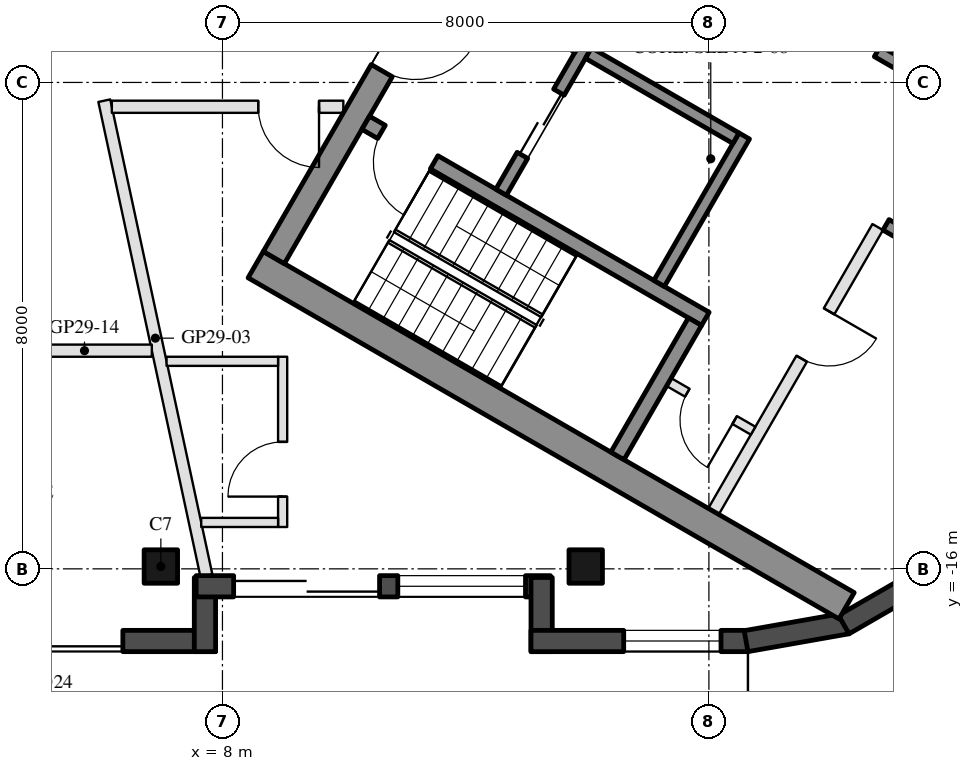
"""IFC4 building model, lengths in metres.
Left out: names, types, materials, properties, quantities, classifications, styles, units other than length and angle.
Written with IfcOpenShell. Run it as: python <this file> out.ifc"""

import sys

from ifc_helpers import new_model, si_unit, direction, frame, frame_2d, origin, origin_2d, place, context, subcontext, project, spatial, rectangle, hollow_rectangle, extrude, boolean, halfspace, element, fill, save


model = new_model("IFC4")
c1 = context("Model", 3, precision=1e-05, world=origin(), true_north=direction((0.0, 1.0)))
c2 = subcontext(c1, "Body", "Model", "MODEL_VIEW")
j1 = project(units=[si_unit("LENGTHUNIT", "METRE"), si_unit("PLANEANGLEUNIT", "RADIAN")], contexts=[c1])
p1 = place(None, origin())
s1 = spatial("IfcSite", under=j1, at=p1, CompositionType="ELEMENT")
p2 = place(p1, origin())
s2 = spatial("IfcBuilding", under=s1, at=p2, CompositionType="ELEMENT")
p3 = place(p2, frame((0.0, 0.0, 294.8)))
s3 = spatial("IfcBuildingStorey", under=s2, at=p3, CompositionType="ELEMENT", Elevation=294.8)
p4 = place(p3, frame((6.987, -15.962, 0.0), z_axis=(0.0, 0.0, 1.0), x_axis=(-1.0, 0.0, 0.0)))
e1 = element("IfcColumn", 1, at=p4, inside=s3, PredefinedType="COLUMN", context=c2, shape_type="SweptSolid", body=[
    boolean("DIFFERENCE", extrude(hollow_rectangle(XDim=0.55, YDim=0.55, WallThickness=0.025, at=origin_2d()), origin(), (0.0, 0.0, 1.0), 3.7), halfspace(frame((0.0, 0.0, 3.666), z_axis=(0.0, 0.0, 1.0), x_axis=(1.0, 0.0, 0.0)), False)),
])
p5 = place(p3, frame((13.974, -15.962, 0.0), z_axis=(0.0, 0.0, 1.0), x_axis=(-1.0, 0.0, 0.0)))
e2 = element("IfcColumn", 2, at=p5, inside=s3, PredefinedType="COLUMN", context=c2, shape_type="SweptSolid", body=[
    boolean("DIFFERENCE", extrude(hollow_rectangle(XDim=0.55, YDim=0.55, WallThickness=0.025, at=origin_2d()), origin(), (0.0, 0.0, 1.0), 3.7), halfspace(frame((0.0, 0.0, 3.66), z_axis=(0.0, 0.0, 1.0), x_axis=(1.0, 0.0, 0.0)), False)),
])
p6 = place(p3, frame((-0.9, -17.187, 0.0), z_axis=(0.0, 0.0, 1.0), x_axis=(1.0, 0.0, 0.0)))
e3 = element("IfcWall", 3, at=p6, inside=s3, PredefinedType="SOLIDWALL", context=c2, shape_type="SweptSolid", body=[
    extrude(rectangle(XDim=8.787, YDim=0.35, at=frame_2d((4.394, 0.0))), origin(), (0.0, 0.0, 1.0), 3.55),
])
p7 = place(p6, frame((4.862, 0.0, 0.0)))
e4 = element("IfcOpeningElement", 4, at=p7, cuts=e3, PredefinedType="OPENING", context=c2, shape_type="SweptSolid", body=[
    extrude(rectangle(XDim=2.4, YDim=2.4, at=frame_2d((1.2, 1.2))), frame((0.0, 0.185, 0.0), z_axis=(0.0, -1.0, 0.0), x_axis=(1.0, 0.0, 0.0)), (0.0, 0.0, 1.0), 0.37),
])
p8 = place(p6, frame((2.55, 0.0, 0.3)))
e5 = element("IfcOpeningElement", 5, at=p8, cuts=e3, PredefinedType="OPENING", context=c2, shape_type="SweptSolid", body=[
    extrude(rectangle(XDim=2.0, YDim=2.65, at=frame_2d((1.0, 1.325))), frame((0.0, 0.185, 0.0), z_axis=(0.0, -1.0, 0.0), x_axis=(1.0, 0.0, 0.0)), (0.0, 0.0, 1.0), 0.37),
])
p9 = place(p3, frame((7.712, -17.362, 0.0), z_axis=(0.0, 0.0, 1.0), x_axis=(0.0, 1.0, 0.0)))
e6 = element("IfcWall", 6, at=p9, inside=s3, PredefinedType="SOLIDWALL", context=c2, shape_type="SweptSolid", body=[
    extrude(rectangle(XDim=1.22, YDim=0.35, at=frame_2d((0.61, 0.0))), origin(), (0.0, 0.0, 1.0), 3.55),
])
p10 = place(p3, frame((7.567, -16.287, 0.0), z_axis=(0.0, 0.0, 1.0), x_axis=(1.0, 0.0, 0.0)))
e7 = element("IfcWall", 7, at=p10, inside=s3, PredefinedType="SOLIDWALL", context=c2, shape_type="SweptSolid", body=[
    extrude(rectangle(XDim=5.827, YDim=0.35, at=frame_2d((2.914, 0.0))), origin(), (0.0, 0.0, 1.0), 3.55),
])
p11 = place(p10, frame((0.617, 0.0, 0.0)))
e8 = element("IfcOpeningElement", 8, at=p11, cuts=e7, PredefinedType="OPENING", context=c2, shape_type="SweptSolid", body=[
    extrude(rectangle(XDim=2.4, YDim=2.4, at=frame_2d((1.2, 1.2))), frame((0.0, 0.185, 0.0), z_axis=(0.0, -1.0, 0.0), x_axis=(1.0, 0.0, 0.0)), (0.0, 0.0, 1.0), 0.37),
])
p12 = place(p10, frame((3.317, 0.0, 0.3)))
e9 = element("IfcOpeningElement", 9, at=p12, cuts=e7, PredefinedType="OPENING", context=c2, shape_type="SweptSolid", body=[
    extrude(rectangle(XDim=2.1, YDim=2.65, at=frame_2d((1.05, 1.325))), frame((0.0, 0.185, 0.0), z_axis=(0.0, -1.0, 0.0), x_axis=(1.0, 0.0, 0.0)), (0.0, 0.0, 1.0), 0.37),
])
p13 = place(p3, frame((13.249, -16.142, 0.0), z_axis=(0.0, 0.0, 1.0), x_axis=(0.0, -1.0, 0.0)))
e10 = element("IfcWall", 10, at=p13, inside=s3, PredefinedType="SOLIDWALL", context=c2, shape_type="SweptSolid", body=[
    extrude(rectangle(XDim=1.22, YDim=0.35, at=frame_2d((0.61, 0.0))), origin(), (0.0, 0.0, 1.0), 3.55),
])
p14 = place(p3, frame((13.074, -17.187, 0.0), z_axis=(0.0, 0.0, 1.0), x_axis=(1.0, 0.0, 0.0)))
e11 = element("IfcWall", 11, at=p14, inside=s3, PredefinedType="SOLIDWALL", context=c2, shape_type="SweptSolid", body=[
    extrude(rectangle(XDim=3.567, YDim=0.35, at=frame_2d((1.784, 0.0))), origin(), (0.0, 0.0, 1.0), 3.55),
])
p15 = place(p14, frame((1.525, 0.0, 0.3)))
e12 = element("IfcOpeningElement", 12, at=p15, cuts=e11, PredefinedType="OPENING", context=c2, shape_type="SweptSolid", body=[
    extrude(rectangle(XDim=1.6, YDim=2.65, at=frame_2d((0.8, 1.325))), frame((0.0, 0.185, 0.0), z_axis=(0.0, -1.0, 0.0), x_axis=(1.0, 0.0, 0.0)), (0.0, 0.0, 1.0), 0.37),
])
for number, where, z_axis, x_axis in (
    (13, (16.611, -17.189, 0.0), (0.0, 0.0, 1.0), (0.985, 0.174, 0.0)),
    (14, (18.218, -16.917, 0.0), (0.0, 0.0, 1.0), (0.866, 0.5, 0.0)),
):
    element("IfcWall", number, at=place(p3, frame(where, z_axis=z_axis, x_axis=x_axis)), inside=s3, PredefinedType="SOLIDWALL", context=c2, shape_type="SweptSolid", body=[
        extrude(rectangle(XDim=1.689, YDim=0.35, at=frame_2d((0.845, 0.0))), origin(), (0.0, 0.0, 1.0), 3.55),
    ])
for number, where, z_axis, x_axis in (
    (15, (8.547, -10.997, 0.0), (0.0, 0.0, 1.0), (0.866, -0.5, 0.0)),
    (16, (13.797, -1.903, 0.0), (0.0, 0.0, 1.0), (0.866, -0.5, 0.0)),
):
    element("IfcWall", number, at=place(p3, frame(where, z_axis=z_axis, x_axis=x_axis)), inside=s3, PredefinedType="SHEAR", context=c2, shape_type="SweptSolid", body=[
        extrude(rectangle(XDim=11.222, YDim=0.5, at=frame_2d((5.611, 0.0))), origin(), (0.0, 0.0, 1.0), 3.5),
    ])
p16 = place(p3, frame((8.845, -10.88, 0.0), z_axis=(0.0, 0.0, 1.0), x_axis=(0.500004234368, 0.866022959057, 0.0)))
e17 = element("IfcWall", 17, at=p16, inside=s3, PredefinedType="SHEAR", context=c2, shape_type="SweptSolid", body=[
    extrude(rectangle(XDim=10.0, YDim=0.4, at=frame_2d((5.0, 0.0))), origin(), (0.0, 0.0, 1.0), 3.5),
])
p17 = place(p16, frame((3.55, 0.0, 0.0)))
e18 = element("IfcOpeningElement", 18, at=p17, cuts=e17, PredefinedType="OPENING", context=c2, shape_type="SweptSolid", body=[
    extrude(rectangle(XDim=1.1, YDim=2.1, at=frame_2d((0.55, 1.05))), frame((0.0, 0.21, 0.0), z_axis=(0.0, -1.0, 0.0), x_axis=(1.0, 0.0, 0.0)), (0.0, 0.0, 1.0), 0.42),
])
p18 = place(p16, frame((5.85, 0.0, 0.0)))
e19 = element("IfcOpeningElement", 19, at=p18, cuts=e17, PredefinedType="OPENING", context=c2, shape_type="SweptSolid", body=[
    extrude(rectangle(XDim=1.4, YDim=2.1, at=frame_2d((0.7, 1.05))), frame((0.0, 0.21, 0.0), z_axis=(0.0, -1.0, 0.0), x_axis=(1.0, 0.0, 0.0)), (0.0, 0.0, 1.0), 0.42),
])
p19 = place(p3, frame((10.356, -8.664, 0.0), z_axis=(0.0, 0.0, 1.0), x_axis=(0.866028629588, -0.499994412703, 0.0)))
e20 = element("IfcWall", 20, at=p19, inside=s3, PredefinedType="SHEAR", context=c2, shape_type="SweptSolid", body=[
    extrude(rectangle(XDim=6.45, YDim=0.25, at=frame_2d((3.225, 0.0))), origin(), (0.0, 0.0, 1.0), 3.5),
])
p20 = place(p19, frame((0.3, 0.0, 0.0)))
e21 = element("IfcOpeningElement", 21, at=p20, cuts=e20, PredefinedType="OPENING", context=c2, shape_type="SweptSolid", body=[
    extrude(rectangle(XDim=1.0, YDim=2.1, at=frame_2d((0.5, 1.05))), frame((0.0, 0.135, 0.0), z_axis=(0.0, -1.0, 0.0), x_axis=(1.0, 0.0, 0.0)), (0.0, 0.0, 1.0), 0.27),
])
p21 = place(p3, frame((14.496, -14.143, 0.0), z_axis=(0.0, 0.0, 1.0), x_axis=(0.500062241894, 0.865989465428, 0.0)))
e22 = element("IfcWall", 22, at=p21, inside=s3, PredefinedType="SHEAR", context=c2, shape_type="SweptSolid", body=[
    extrude(rectangle(XDim=2.55, YDim=0.25, at=frame_2d((1.275, 0.0))), origin(), (0.0, 0.0, 1.0), 3.5),
])
p22 = place(p3, frame((15.181, -11.305, 0.0), z_axis=(0.0, 0.0, 1.0), x_axis=(0.49994636267, 0.866056369097, 0.0)))
e23 = element("IfcWall", 23, at=p22, inside=s3, PredefinedType="SHEAR", context=c2, shape_type="SweptSolid", body=[
    extrude(rectangle(XDim=2.8, YDim=0.2, at=frame_2d((1.4, 0.0))), origin(), (0.0, 0.0, 1.0), 3.5),
])
p23 = place(p3, frame((12.583, -9.805, 0.0), z_axis=(0.0, 0.0, 1.0), x_axis=(0.49994636267, 0.866056369097, 0.0)))
e24 = element("IfcWall", 24, at=p23, inside=s3, PredefinedType="SHEAR", context=c2, shape_type="SweptSolid", body=[
    extrude(rectangle(XDim=2.8, YDim=0.2, at=frame_2d((1.4, 0.0))), origin(), (0.0, 0.0, 1.0), 3.5),
])
p24 = place(p23, frame((0.7, 0.0, 0.0)))
e25 = element("IfcOpeningElement", 25, at=p24, cuts=e24, PredefinedType="OPENING", context=c2, shape_type="SweptSolid", body=[
    extrude(rectangle(XDim=1.2, YDim=2.1, at=frame_2d((0.6, 1.05))), frame((0.0, 0.11, 0.0), z_axis=(0.0, -1.0, 0.0), x_axis=(1.0, 0.0, 0.0)), (0.0, 0.0, 1.0), 0.22),
])
p25 = place(p3, frame((11.768, -6.217, 0.0), z_axis=(0.0, 0.0, 1.0), x_axis=(0.866050077142, -0.499957262057, 0.0)))
e26 = element("IfcWall", 26, at=p25, inside=s3, PredefinedType="SHEAR", context=c2, shape_type="SweptSolid", body=[
    extrude(rectangle(XDim=2.4, YDim=0.2, at=frame_2d((1.2, 0.0))), origin(), (0.0, 0.0, 1.0), 3.5),
])
p26 = place(p3, frame((14.02, -7.517, 0.0), z_axis=(0.0, 0.0, 1.0), x_axis=(0.866034573852, -0.49998411664, 0.0)))
e27 = element("IfcWall", 27, at=p26, inside=s3, PredefinedType="SHEAR", context=c2, shape_type="SweptSolid", body=[
    extrude(rectangle(XDim=2.8, YDim=0.2, at=frame_2d((1.4, 0.0))), origin(), (0.0, 0.0, 1.0), 3.5),
])
p27 = place(p3, frame((12.968, -4.138, 0.0), z_axis=(0.0, 0.0, 1.0), x_axis=(0.866028328073, -0.49999493495, 0.0)))
e28 = element("IfcWall", 28, at=p27, inside=s3, PredefinedType="SHEAR", context=c2, shape_type="SweptSolid", body=[
    extrude(rectangle(XDim=10.16, YDim=0.2, at=frame_2d((5.08, 0.0))), origin(), (0.0, 0.0, 1.0), 3.5),
])
p28 = place(p27, frame((0.62, 0.0, 0.0)))
e29 = element("IfcOpeningElement", 29, at=p28, cuts=e28, PredefinedType="OPENING", context=c2, shape_type="SweptSolid", body=[
    extrude(rectangle(XDim=1.1, YDim=2.1, at=frame_2d((0.55, 1.05))), frame((0.0, 0.11, 0.0), z_axis=(0.0, -1.0, 0.0), x_axis=(1.0, 0.0, 0.0)), (0.0, 0.0, 1.0), 0.22),
])
p29 = place(p27, frame((5.8, 0.0, 0.0)))
e30 = element("IfcOpeningElement", 30, at=p29, cuts=e28, PredefinedType="OPENING", context=c2, shape_type="SweptSolid", body=[
    extrude(rectangle(XDim=0.9, YDim=2.1, at=frame_2d((0.45, 1.05))), frame((0.0, 0.11, 0.0), z_axis=(0.0, -1.0, 0.0), x_axis=(1.0, 0.0, 0.0)), (0.0, 0.0, 1.0), 0.22),
])
p30 = place(p3, frame((18.913, -10.342, 0.0), z_axis=(0.0, 0.0, 1.0), x_axis=(0.866053003207, -0.499952193351, 0.0)))
e31 = element("IfcWall", 31, at=p30, inside=s3, PredefinedType="SHEAR", context=c2, shape_type="SweptSolid", body=[
    extrude(rectangle(XDim=1.625, YDim=0.2, at=frame_2d((0.812, 0.0))), origin(), (0.0, 0.0, 1.0), 3.5),
])
p31 = place(p3, frame((16.076, -15.055, 0.0), z_axis=(0.0, 0.0, 1.0), x_axis=(0.499995103361, 0.866028230842, 0.0)))
e32 = element("IfcWall", 32, at=p31, inside=s3, PredefinedType="PARTITIONING", context=c2, shape_type="SweptSolid", body=[
    extrude(rectangle(XDim=5.4, YDim=0.2, at=frame_2d((2.7, 0.0))), origin(), (0.0, 0.0, 1.0), 3.5),
])
p32 = place(p31, frame((2.9, 0.0, 0.0)))
e33 = element("IfcOpeningElement", 33, at=p32, cuts=e32, PredefinedType="OPENING", context=c2, shape_type="SweptSolid", body=[
    extrude(rectangle(XDim=0.9, YDim=2.1, at=frame_2d((0.45, 1.05))), frame((0.0, 0.11, 0.0), z_axis=(0.0, -1.0, 0.0), x_axis=(1.0, 0.0, 0.0)), (0.0, 0.0, 1.0), 0.22),
])
p33 = place(p3, frame((15.342, -12.928, 0.0), z_axis=(0.0, 0.0, 1.0), x_axis=(0.865989903783, -0.500061482766, 0.0)))
e34 = element("IfcWall", 34, at=p33, inside=s3, PredefinedType="PARTITIONING", context=c2, shape_type="SweptSolid", body=[
    extrude(rectangle(XDim=1.6, YDim=0.15, at=frame_2d((0.8, 0.0))), origin(), (0.0, 0.0, 1.0), 3.5),
])
p34 = place(p33, frame((0.35, 0.0, 0.0)))
e35 = element("IfcOpeningElement", 35, at=p34, cuts=e34, PredefinedType="OPENING", context=c2, shape_type="SweptSolid", body=[
    extrude(rectangle(XDim=0.9, YDim=2.1, at=frame_2d((0.45, 1.05))), frame((0.0, 0.085, 0.0), z_axis=(0.0, -1.0, 0.0), x_axis=(1.0, 0.0, 0.0)), (0.0, 0.0, 1.0), 0.17),
])
p35 = place(p3, frame((7.737, -16.112, 0.0), z_axis=(0.0, 0.0, 1.0), x_axis=(-0.210221826162, 0.977653713646, 0.0)))
e36 = element("IfcWall", 36, at=p35, inside=s3, PredefinedType="PARTITIONING", context=c2, shape_type="SweptSolid", body=[
    extrude(rectangle(XDim=7.99, YDim=0.2, at=frame_2d((3.995, 0.0))), origin(), (0.0, 0.0, 1.0), 3.05),
])
p36 = place(p3, frame((6.839, -12.412, 0.0), z_axis=(0.0, 0.0, 1.0), x_axis=(-1.0, 0.0, 0.0)))
e37 = element("IfcWall", 37, at=p36, inside=s3, PredefinedType="PARTITIONING", context=c2, shape_type="SweptSolid", body=[
    extrude(rectangle(XDim=5.539, YDim=0.2, at=frame_2d((2.769, 0.0))), origin(), (0.0, 0.0, 1.0), 3.05),
])
p37 = place(p36, frame((2.269, 0.0, 0.0)))
e38 = element("IfcOpeningElement", 38, at=p37, cuts=e37, PredefinedType="OPENING", context=c2, shape_type="SweptSolid", body=[
    extrude(rectangle(XDim=1.0, YDim=2.1, at=frame_2d((0.5, 1.05))), frame((0.0, 0.11, 0.0), z_axis=(0.0, -1.0, 0.0), x_axis=(1.0, 0.0, 0.0)), (0.0, 0.0, 1.0), 0.22),
])
p38 = place(p3, frame((9.988, -8.4, 0.0), z_axis=(0.0, 0.0, 1.0), x_axis=(-1.0, 0.0, 0.0)))
e39 = element("IfcWall", 39, at=p38, inside=s3, PredefinedType="PARTITIONING", context=c2, shape_type="SweptSolid", body=[
    extrude(rectangle(XDim=3.807, YDim=0.2, at=frame_2d((1.904, 0.0))), origin(), (0.0, 0.0, 1.0), 3.05),
])
p39 = place(p38, frame((0.4, 0.0, 0.0)))
e40 = element("IfcOpeningElement", 40, at=p39, cuts=e39, PredefinedType="OPENING", context=c2, shape_type="SweptSolid", body=[
    extrude(rectangle(XDim=1.0, YDim=2.1, at=frame_2d((0.5, 1.05))), frame((0.0, 0.11, 0.0), z_axis=(0.0, -1.0, 0.0), x_axis=(1.0, 0.0, 0.0)), (0.0, 0.0, 1.0), 0.22),
])
p40 = place(p3, frame((8.99, -15.312, 0.0), z_axis=(0.0, 0.0, 1.0), x_axis=(0.0, 1.0, 0.0)))
e41 = element("IfcWall", 41, at=p40, inside=s3, PredefinedType="PARTITIONING", context=c2, shape_type="SweptSolid", body=[
    extrude(rectangle(XDim=2.8, YDim=0.15, at=frame_2d((1.4, 0.0))), origin(), (0.0, 0.0, 1.0), 3.1),
])
p41 = place(p40, frame((0.5, 0.0, 0.0)))
e42 = element("IfcOpeningElement", 42, at=p41, cuts=e41, PredefinedType="OPENING", context=c2, shape_type="SweptSolid", body=[
    extrude(rectangle(XDim=0.9, YDim=2.1, at=frame_2d((0.45, 1.05))), frame((0.0, 0.085, 0.0), z_axis=(0.0, -1.0, 0.0), x_axis=(1.0, 0.0, 0.0)), (0.0, 0.0, 1.0), 0.17),
])
p42 = place(p3, frame((7.651, -15.237, 0.0), z_axis=(0.0, 0.0, 1.0), x_axis=(1.0, 0.0, 0.0)))
e43 = element("IfcWall", 43, at=p42, inside=s3, PredefinedType="PARTITIONING", context=c2, shape_type="SweptSolid", body=[
    extrude(rectangle(XDim=1.264, YDim=0.15, at=frame_2d((0.632, 0.0))), origin(), (0.0, 0.0, 1.0), 3.1),
])
p43 = place(p3, frame((7.081, -12.587, 0.0), z_axis=(0.0, 0.0, 1.0), x_axis=(1.0, 0.0, 0.0)))
e44 = element("IfcWall", 44, at=p43, inside=s3, PredefinedType="PARTITIONING", context=c2, shape_type="SweptSolid", body=[
    extrude(rectangle(XDim=1.834, YDim=0.15, at=frame_2d((0.917, 0.0))), origin(), (0.0, 0.0, 1.0), 3.05),
])
p44 = place(p7, frame((2.4, 0.0, 0.0), z_axis=(0.0, 0.0, 1.0), x_axis=(-1.0, 0.0, 0.0)))
e45 = element("IfcDoor", 45, at=p44, inside=s3, OperationType="SLIDING_TO_LEFT", PredefinedType="DOOR", context=c2, shape_type="SweptSolid", body=[
    extrude(rectangle(XDim=2.4, YDim=2.4, at=frame_2d((1.2, 1.2))), frame((0.0, 0.025, 0.0), z_axis=(0.0, -1.0, 0.0), x_axis=(1.0, 0.0, 0.0)), (0.0, 0.0, 1.0), 0.05),
])
fill(e4, e45)
p45 = place(p11, frame((2.4, 0.0, 0.0), z_axis=(0.0, 0.0, 1.0), x_axis=(-1.0, 0.0, 0.0)))
e46 = element("IfcDoor", 46, at=p45, inside=s3, OperationType="SLIDING_TO_LEFT", PredefinedType="DOOR", context=c2, shape_type="SweptSolid", body=[
    extrude(rectangle(XDim=2.4, YDim=2.4, at=frame_2d((1.2, 1.2))), frame((0.0, 0.025, 0.0), z_axis=(0.0, -1.0, 0.0), x_axis=(1.0, 0.0, 0.0)), (0.0, 0.0, 1.0), 0.05),
])
fill(e8, e46)
p46 = place(p12, origin())
e47 = element("IfcWindow", 47, at=p46, inside=s3, PartitioningType="SINGLE_PANEL", PredefinedType="WINDOW", context=c2, shape_type="SweptSolid", body=[
    extrude(rectangle(XDim=2.1, YDim=2.65, at=frame_2d((1.05, 1.325))), frame((0.0, 0.03, 0.0), z_axis=(0.0, -1.0, 0.0), x_axis=(1.0, 0.0, 0.0)), (0.0, 0.0, 1.0), 0.06),
])
fill(e9, e47)
p47 = place(p15, origin())
e48 = element("IfcWindow", 48, at=p47, inside=s3, PartitioningType="SINGLE_PANEL", PredefinedType="WINDOW", context=c2, shape_type="SweptSolid", body=[
    extrude(rectangle(XDim=1.6, YDim=2.65, at=frame_2d((0.8, 1.325))), frame((0.0, 0.03, 0.0), z_axis=(0.0, -1.0, 0.0), x_axis=(1.0, 0.0, 0.0)), (0.0, 0.0, 1.0), 0.06),
])
fill(e12, e48)
p48 = place(p24, origin())
e49 = element("IfcDoor", 49, at=p48, inside=s3, OperationType="DOUBLE_DOOR_SLIDING", PredefinedType="DOOR", context=c2, shape_type="SweptSolid", body=[
    extrude(rectangle(XDim=1.2, YDim=2.1, at=frame_2d((0.6, 1.05))), frame((0.0, 0.025, 0.0), z_axis=(0.0, -1.0, 0.0), x_axis=(1.0, 0.0, 0.0)), (0.0, 0.0, 1.0), 0.05),
])
fill(e25, e49)
p49 = place(p34, frame((0.9, 0.0, 0.0), z_axis=(0.0, 0.0, 1.0), x_axis=(-1.0, 0.0, 0.0)))
e50 = element("IfcDoor", 50, at=p49, inside=s3, OperationType="SINGLE_SWING_LEFT", PredefinedType="DOOR", context=c2, shape_type="SweptSolid", body=[
    extrude(rectangle(XDim=0.9, YDim=2.1, at=frame_2d((0.45, 1.05))), frame((0.0, 0.025, 0.0), z_axis=(0.0, -1.0, 0.0), x_axis=(1.0, 0.0, 0.0)), (0.0, 0.0, 1.0), 0.05),
])
fill(e35, e50)
p50 = place(p29, origin())
e51 = element("IfcDoor", 51, at=p50, inside=s3, OperationType="SINGLE_SWING_LEFT", PredefinedType="DOOR", context=c2, shape_type="SweptSolid", body=[
    extrude(rectangle(XDim=0.9, YDim=2.1, at=frame_2d((0.45, 1.05))), frame((0.0, 0.025, 0.0), z_axis=(0.0, -1.0, 0.0), x_axis=(1.0, 0.0, 0.0)), (0.0, 0.0, 1.0), 0.05),
])
fill(e30, e51)
p51 = place(p32, frame((0.9, 0.0, 0.0), z_axis=(0.0, 0.0, 1.0), x_axis=(-1.0, 0.0, 0.0)))
e52 = element("IfcDoor", 52, at=p51, inside=s3, OperationType="SINGLE_SWING_LEFT", PredefinedType="DOOR", context=c2, shape_type="SweptSolid", body=[
    extrude(rectangle(XDim=0.9, YDim=2.1, at=frame_2d((0.45, 1.05))), frame((0.0, 0.025, 0.0), z_axis=(0.0, -1.0, 0.0), x_axis=(1.0, 0.0, 0.0)), (0.0, 0.0, 1.0), 0.05),
])
fill(e33, e52)
p52 = place(p17, frame((1.1, 0.0, 0.0), z_axis=(0.0, 0.0, 1.0), x_axis=(-1.0, 0.0, 0.0)))
e53 = element("IfcDoor", 53, at=p52, inside=s3, OperationType="SINGLE_SWING_LEFT", PredefinedType="DOOR", context=c2, shape_type="SweptSolid", body=[
    extrude(rectangle(XDim=1.1, YDim=2.1, at=frame_2d((0.55, 1.05))), frame((0.0, 0.025, 0.0), z_axis=(0.0, -1.0, 0.0), x_axis=(1.0, 0.0, 0.0)), (0.0, 0.0, 1.0), 0.05),
])
fill(e18, e53)
p53 = place(p20, frame((1.0, 0.0, 0.0), z_axis=(0.0, 0.0, 1.0), x_axis=(-1.0, 0.0, 0.0)))
e54 = element("IfcDoor", 54, at=p53, inside=s3, OperationType="SINGLE_SWING_LEFT", PredefinedType="DOOR", context=c2, shape_type="SweptSolid", body=[
    extrude(rectangle(XDim=1.0, YDim=2.1, at=frame_2d((0.5, 1.05))), frame((0.0, 0.025, 0.0), z_axis=(0.0, -1.0, 0.0), x_axis=(1.0, 0.0, 0.0)), (0.0, 0.0, 1.0), 0.05),
])
fill(e21, e54)
p54 = place(p41, origin())
e55 = element("IfcDoor", 55, at=p54, inside=s3, OperationType="SINGLE_SWING_LEFT", PredefinedType="DOOR", context=c2, shape_type="SweptSolid", body=[
    extrude(rectangle(XDim=0.9, YDim=2.1, at=frame_2d((0.45, 1.05))), frame((0.0, 0.025, 0.0), z_axis=(0.0, -1.0, 0.0), x_axis=(1.0, 0.0, 0.0)), (0.0, 0.0, 1.0), 0.05),
])
fill(e42, e55)
p55 = place(p39, origin())
e56 = element("IfcDoor", 56, at=p55, inside=s3, OperationType="SINGLE_SWING_LEFT", PredefinedType="DOOR", context=c2, shape_type="SweptSolid", body=[
    extrude(rectangle(XDim=1.0, YDim=2.1, at=frame_2d((0.5, 1.05))), frame((0.0, 0.025, 0.0), z_axis=(0.0, -1.0, 0.0), x_axis=(1.0, 0.0, 0.0)), (0.0, 0.0, 1.0), 0.05),
])
fill(e40, e56)
save(model, sys.argv[1])
